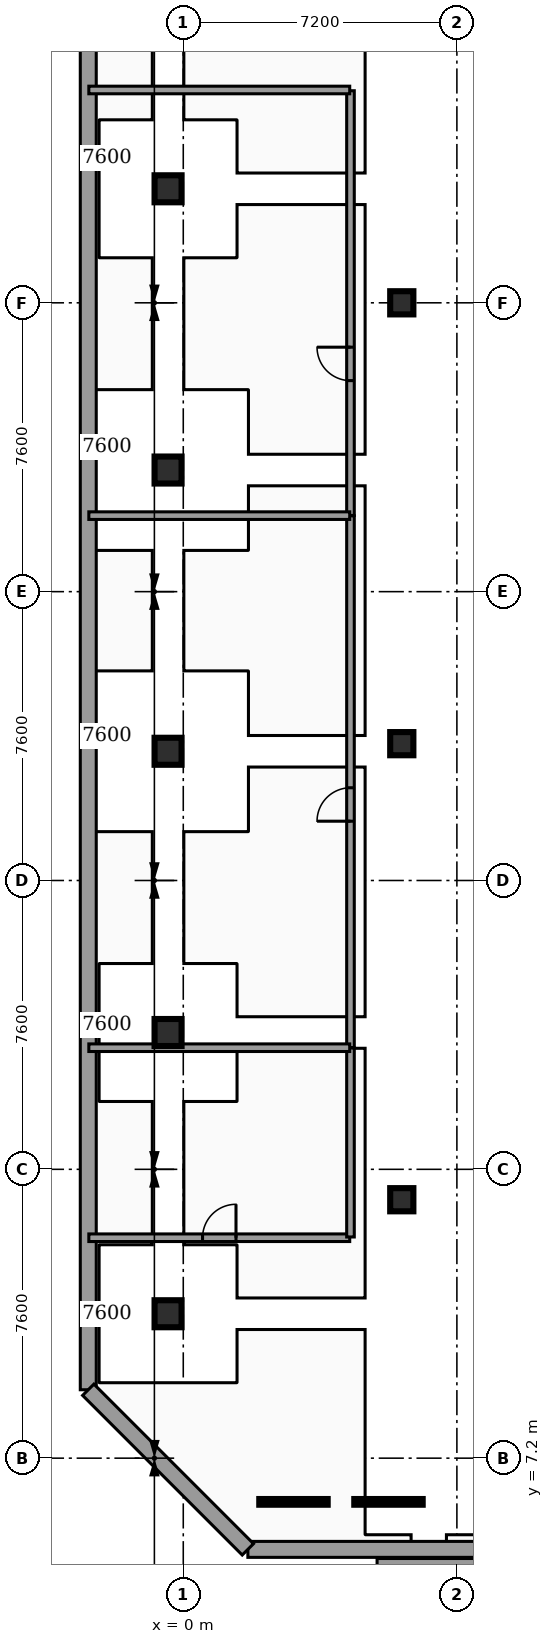
"""IFC4 building model, lengths in metres.
Left out: names, types, materials, properties, quantities, classifications, styles, units other than length and angle.
Written with IfcOpenShell. Run it as: python <this file> out.ifc"""

import sys

from ifc_helpers import new_model, si_unit, direction, frame, frame_2d, origin, origin_2d, place, context, subcontext, project, spatial, rectangle, hollow_circle, extrude, element, fill, save


model = new_model("IFC4")
c1 = context("Model", 3, precision=1e-05, world=origin(), true_north=direction((0.0, 1.0)))
c2 = subcontext(c1, "Body", "Model", "MODEL_VIEW")
j1 = project(units=[si_unit("LENGTHUNIT", "METRE"), si_unit("PLANEANGLEUNIT", "RADIAN")], contexts=[c1])
p1 = place(None, origin())
s1 = spatial("IfcSite", under=j1, at=p1, CompositionType="ELEMENT")
p2 = place(p1, origin())
s2 = spatial("IfcBuilding", under=s1, at=p2, CompositionType="ELEMENT")
p3 = place(p2, frame((0.0, 0.0, -8.16)))
s3 = spatial("IfcBuildingStorey", under=s2, at=p3, CompositionType="ELEMENT", Elevation=-8.16)
p4 = place(p3, frame((5.1, 4.35, 0.0), z_axis=(0.0, 0.0, 1.0), x_axis=(1.0, 0.0, 0.0)))
e1 = element("IfcWall", 1, at=p4, inside=s3, PredefinedType="SOLIDWALL", context=c2, shape_type="SweptSolid", body=[
    extrude(rectangle(XDim=5.1, YDim=0.42, at=frame_2d((2.55, 0.0))), origin(), (0.0, 0.0, 1.0), 4.08),
])
p5 = place(p3, frame((1.7, 4.8, 0.0), z_axis=(0.0, 0.0, 1.0), x_axis=(1.0, 0.0, 0.0)))
e2 = element("IfcWall", 2, at=p5, inside=s3, PredefinedType="SOLIDWALL", context=c2, shape_type="SweptSolid", body=[
    extrude(rectangle(XDim=73.4, YDim=0.42, at=frame_2d((36.7, 0.0))), origin(), (0.0, 0.0, 1.0), 3.76),
])
p6 = place(p3, frame((-2.5, 9.0, 0.0), z_axis=(0.0, 0.0, 1.0), x_axis=(0.0, 1.0, 0.0)))
e3 = element("IfcWall", 3, at=p6, inside=s3, PredefinedType="SOLIDWALL", context=c2, shape_type="SweptSolid", body=[
    extrude(rectangle(XDim=39.0, YDim=0.42, at=frame_2d((19.5, 0.0))), origin(), (0.0, 0.0, 1.0), 3.76),
])
p7 = place(p3, frame((-2.5, 9.0, 0.0), z_axis=(0.0, 0.0, 1.0), x_axis=(0.707106781187, -0.707106781187, 0.0)))
e4 = element("IfcWall", 4, at=p7, inside=s3, PredefinedType="SOLIDWALL", context=c2, shape_type="SweptSolid", body=[
    extrude(rectangle(XDim=5.94, YDim=0.42, at=frame_2d((2.97, 0.0))), origin(), (0.0, 0.0, 1.0), 3.76),
])
for number, where, z_axis, x_axis in (
    (5, (-0.4, 40.6, 0.0), (0.0, 0.0, 1.0), (1.0, 0.0, 0.0)),
    (6, (-0.4, 11.0, 0.0), (0.0, 0.0, 1.0), (1.0, 0.0, 0.0)),
    (7, (-0.4, 18.4, 0.0), (0.0, 0.0, 1.0), (1.0, 0.0, 0.0)),
    (8, (-0.4, 25.8, 0.0), (0.0, 0.0, 1.0), (1.0, 0.0, 0.0)),
    (9, (-0.4, 33.2, 0.0), (0.0, 0.0, 1.0), (1.0, 0.0, 0.0)),
):
    element("IfcColumn", number, at=place(p3, frame(where, z_axis=z_axis, x_axis=x_axis)), inside=s3, PredefinedType="COLUMN", context=c2, shape_type="SweptSolid", body=[
        extrude(hollow_circle(Radius=0.355, WallThickness=0.03, at=origin_2d()), origin(), (0.0, 0.0, 1.0), 3.76),
    ])
p8 = place(p3, frame((5.75, 37.6, 0.0), z_axis=(0.0, 0.0, 1.0), x_axis=(1.0, 0.0, 0.0)))
e10 = element("IfcColumn", 10, at=p8, inside=s3, PredefinedType="COLUMN", context=c2, shape_type="SweptSolid", body=[
    extrude(hollow_circle(Radius=0.305, WallThickness=0.025, at=origin_2d()), origin(), (0.0, 0.0, 1.0), 3.78),
])
for number, where, z_axis, x_axis in (
    (11, (5.75, 14.0, 0.0), (0.0, 0.0, 1.0), (1.0, 0.0, 0.0)),
    (12, (5.75, 26.0, 0.0), (0.0, 0.0, 1.0), (1.0, 0.0, 0.0)),
):
    element("IfcColumn", number, at=place(p3, frame(where, z_axis=z_axis, x_axis=x_axis)), inside=s3, PredefinedType="COLUMN", context=c2, shape_type="SweptSolid", body=[
        extrude(hollow_circle(Radius=0.305, WallThickness=0.025, at=origin_2d()), origin(), (0.0, 0.0, 1.0), 4.08),
    ])
p9 = place(p3, frame((-2.485, 13.0, 0.0), z_axis=(0.0, 0.0, 1.0), x_axis=(1.0, 0.0, 0.0)))
e13 = element("IfcWall", 13, at=p9, inside=s3, PredefinedType="PARTITIONING", context=c2, shape_type="SweptSolid", body=[
    extrude(rectangle(XDim=6.865, YDim=0.2, at=frame_2d((3.433, 0.0))), origin(), (0.0, 0.0, 1.0), 2.717),
])
p10 = place(p9, frame((2.992, 0.0, 0.0)))
e14 = element("IfcOpeningElement", 14, at=p10, cuts=e13, PredefinedType="OPENING", context=c2, shape_type="SweptSolid", body=[
    extrude(rectangle(XDim=0.88, YDim=2.05, at=frame_2d((0.44, 1.025))), frame((0.0, 0.11, 0.0), z_axis=(0.0, -1.0, 0.0), x_axis=(1.0, 0.0, 0.0)), (0.0, 0.0, 1.0), 0.22),
])
p11 = place(p3, frame((4.4, 13.02, 0.0), z_axis=(0.0, 0.0, 1.0), x_axis=(0.0, 1.0, 0.0)))
e15 = element("IfcWall", 15, at=p11, inside=s3, PredefinedType="PARTITIONING", context=c2, shape_type="SweptSolid", body=[
    extrude(rectangle(XDim=4.975, YDim=0.2, at=frame_2d((2.488, 0.0))), origin(), (0.0, 0.0, 1.0), 2.717),
])
p12 = place(p3, frame((4.4, 18.005, 0.0), z_axis=(0.0, 0.0, 1.0), x_axis=(0.0, 1.0, 0.0)))
e16 = element("IfcWall", 16, at=p12, inside=s3, PredefinedType="PARTITIONING", context=c2, shape_type="SweptSolid", body=[
    extrude(rectangle(XDim=13.99, YDim=0.2, at=frame_2d((6.995, 0.0))), origin(), (0.0, 0.0, 1.0), 2.717),
])
p13 = place(p12, frame((5.955, 0.0, 0.0)))
e17 = element("IfcOpeningElement", 17, at=p13, cuts=e16, PredefinedType="OPENING", context=c2, shape_type="SweptSolid", body=[
    extrude(rectangle(XDim=0.88, YDim=2.05, at=frame_2d((0.44, 1.025))), frame((0.0, 0.11, 0.0), z_axis=(0.0, -1.0, 0.0), x_axis=(1.0, 0.0, 0.0)), (0.0, 0.0, 1.0), 0.22),
])
p14 = place(p3, frame((4.4, 32.005, 0.0), z_axis=(0.0, 0.0, 1.0), x_axis=(0.0, 1.0, 0.0)))
e18 = element("IfcWall", 18, at=p14, inside=s3, PredefinedType="PARTITIONING", context=c2, shape_type="SweptSolid", body=[
    extrude(rectangle(XDim=11.175, YDim=0.2, at=frame_2d((5.587, 0.0))), origin(), (0.0, 0.0, 1.0), 2.717),
])
p15 = place(p14, frame((3.548, 0.0, 0.0)))
e19 = element("IfcOpeningElement", 19, at=p15, cuts=e18, PredefinedType="OPENING", context=c2, shape_type="SweptSolid", body=[
    extrude(rectangle(XDim=0.88, YDim=2.05, at=frame_2d((0.44, 1.025))), frame((0.0, 0.11, 0.0), z_axis=(0.0, -1.0, 0.0), x_axis=(1.0, 0.0, 0.0)), (0.0, 0.0, 1.0), 0.22),
])
for number, where, z_axis, x_axis in (
    (20, (-2.485, 43.2, 0.0), (0.0, 0.0, 1.0), (1.0, 0.0, 0.0)),
    (21, (-2.485, 18.0, 0.0), (0.0, 0.0, 1.0), (1.0, 0.0, 0.0)),
    (22, (-2.485, 32.0, 0.0), (0.0, 0.0, 1.0), (1.0, 0.0, 0.0)),
):
    element("IfcWall", number, at=place(p3, frame(where, z_axis=z_axis, x_axis=x_axis)), inside=s3, PredefinedType="PARTITIONING", context=c2, shape_type="SweptSolid", body=[
        extrude(rectangle(XDim=6.865, YDim=0.2, at=frame_2d((3.433, 0.0))), origin(), (0.0, 0.0, 1.0), 2.717),
    ])
p16 = place(p10, origin())
e23 = element("IfcDoor", 23, at=p16, inside=s3, OperationType="SINGLE_SWING_RIGHT", PredefinedType="DOOR", context=c2, shape_type="SweptSolid", body=[
    extrude(rectangle(XDim=0.88, YDim=2.05, at=frame_2d((0.44, 1.025))), frame((0.0, 0.025, 0.0), z_axis=(0.0, -1.0, 0.0), x_axis=(1.0, 0.0, 0.0)), (0.0, 0.0, 1.0), 0.05),
])
fill(e14, e23)
p17 = place(p13, origin())
e24 = element("IfcDoor", 24, at=p17, inside=s3, OperationType="SINGLE_SWING_LEFT", PredefinedType="DOOR", context=c2, shape_type="SweptSolid", body=[
    extrude(rectangle(XDim=0.88, YDim=2.05, at=frame_2d((0.44, 1.025))), frame((0.0, 0.025, 0.0), z_axis=(0.0, -1.0, 0.0), x_axis=(1.0, 0.0, 0.0)), (0.0, 0.0, 1.0), 0.05),
])
fill(e17, e24)
p18 = place(p15, origin())
e25 = element("IfcDoor", 25, at=p18, inside=s3, OperationType="SINGLE_SWING_RIGHT", PredefinedType="DOOR", context=c2, shape_type="SweptSolid", body=[
    extrude(rectangle(XDim=0.88, YDim=2.05, at=frame_2d((0.44, 1.025))), frame((0.0, 0.025, 0.0), z_axis=(0.0, -1.0, 0.0), x_axis=(1.0, 0.0, 0.0)), (0.0, 0.0, 1.0), 0.05),
])
fill(e19, e25)
save(model, sys.argv[1])
